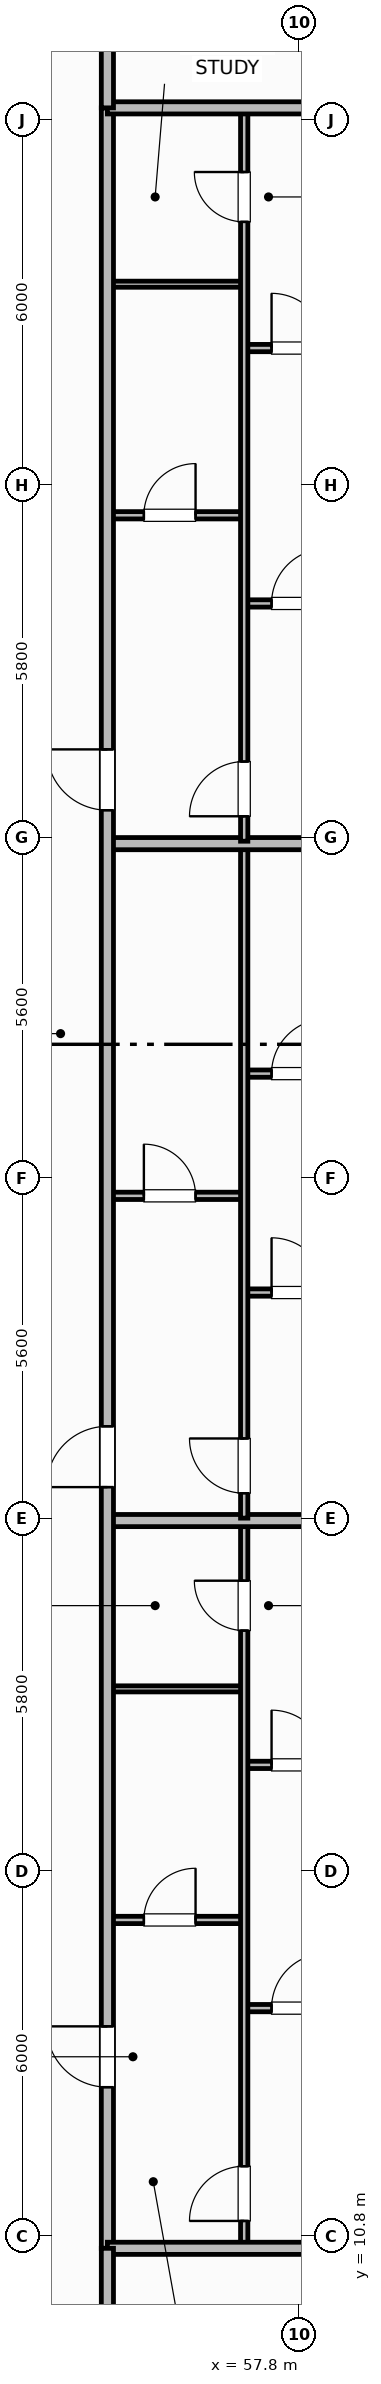
"""IFC4 building model, lengths in metres.
Left out: names, types, materials, properties, quantities, classifications, styles, units other than length and angle.
Written with IfcOpenShell. Run it as: python <this file> out.ifc"""

import sys

from ifc_helpers import new_model, si_unit, direction, frame, frame_2d, origin, place, context, subcontext, project, spatial, rectangle, extrude, element, fill, save


model = new_model("IFC4")
c1 = context("Model", 3, precision=1e-05, world=origin(), true_north=direction((0.0, 1.0)))
c2 = subcontext(c1, "Body", "Model", "MODEL_VIEW")
j1 = project(units=[si_unit("LENGTHUNIT", "METRE"), si_unit("PLANEANGLEUNIT", "RADIAN")], contexts=[c1])
p1 = place(None, origin())
s1 = spatial("IfcSite", under=j1, at=p1, CompositionType="ELEMENT")
p2 = place(p1, origin())
s2 = spatial("IfcBuilding", under=s1, at=p2, CompositionType="ELEMENT")
p3 = place(p2, frame((0.0, 0.0, 125.3)))
s3 = spatial("IfcBuildingStorey", under=s2, at=p3, CompositionType="ELEMENT", Elevation=125.3)
p4 = place(p3, frame((54.65, 16.0, 0.0), z_axis=(0.0, 0.0, 1.0), x_axis=(1.0, 0.0, 0.0)))
e1 = element("IfcWall", 1, at=p4, inside=s3, PredefinedType="PARTITIONING", context=c2, shape_type="SweptSolid", body=[
    extrude(rectangle(XDim=2.25, YDim=0.12, at=frame_2d((1.125, 0.0))), origin(), (0.0, 0.0, 1.0), 2.53),
])
p5 = place(p4, frame((0.6, 0.0, 0.0)))
e2 = element("IfcOpeningElement", 2, at=p5, cuts=e1, PredefinedType="OPENING", context=c2, shape_type="SweptSolid", body=[
    extrude(rectangle(XDim=0.85, YDim=2.1, at=frame_2d((0.425, 1.05))), frame((0.0, 0.07, 0.0), z_axis=(0.0, -1.0, 0.0), x_axis=(1.0, 0.0, 0.0)), (0.0, 0.0, 1.0), 0.14),
])
p6 = place(p3, frame((54.65, 19.8, 0.0), z_axis=(0.0, 0.0, 1.0), x_axis=(1.0, 0.0, 0.0)))
e3 = element("IfcWall", 3, at=p6, inside=s3, PredefinedType="PARTITIONING", context=c2, shape_type="SweptSolid", body=[
    extrude(rectangle(XDim=2.25, YDim=0.1, at=frame_2d((1.125, 0.0))), origin(), (0.0, 0.0, 1.0), 2.53),
])
p7 = place(p3, frame((56.9, 14.55, 0.0), z_axis=(0.0, 0.0, 1.0), x_axis=(1.0, 0.0, 0.0)))
e4 = element("IfcWall", 4, at=p7, inside=s3, PredefinedType="PARTITIONING", context=c2, shape_type="SweptSolid", body=[
    extrude(rectangle(XDim=6.93, YDim=0.12, at=frame_2d((3.465, 0.0))), origin(), (0.0, 0.0, 1.0), 2.53),
])
p8 = place(p7, frame((0.45, 0.0, 0.0)))
e5 = element("IfcOpeningElement", 5, at=p8, cuts=e4, PredefinedType="OPENING", context=c2, shape_type="SweptSolid", body=[
    extrude(rectangle(XDim=0.9, YDim=2.1, at=frame_2d((0.45, 1.05))), frame((0.0, 0.07, 0.0), z_axis=(0.0, -1.0, 0.0), x_axis=(1.0, 0.0, 0.0)), (0.0, 0.0, 1.0), 0.14),
])
p9 = place(p3, frame((56.9, 18.55, 0.0), z_axis=(0.0, 0.0, 1.0), x_axis=(1.0, 0.0, 0.0)))
e6 = element("IfcWall", 6, at=p9, inside=s3, PredefinedType="PARTITIONING", context=c2, shape_type="SweptSolid", body=[
    extrude(rectangle(XDim=6.93, YDim=0.12, at=frame_2d((3.465, 0.0))), origin(), (0.0, 0.0, 1.0), 2.53),
])
p10 = place(p9, frame((0.45, 0.0, 0.0)))
e7 = element("IfcOpeningElement", 7, at=p10, cuts=e6, PredefinedType="OPENING", context=c2, shape_type="SweptSolid", body=[
    extrude(rectangle(XDim=0.9, YDim=2.1, at=frame_2d((0.45, 1.05))), frame((0.0, 0.07, 0.0), z_axis=(0.0, -1.0, 0.0), x_axis=(1.0, 0.0, 0.0)), (0.0, 0.0, 1.0), 0.14),
])
p11 = place(p3, frame((56.9, 10.64, 0.0), z_axis=(0.0, 0.0, 1.0), x_axis=(0.0, 1.0, 0.0)))
e8 = element("IfcWall", 8, at=p11, inside=s3, PredefinedType="PARTITIONING", context=c2, shape_type="SweptSolid", body=[
    extrude(rectangle(XDim=11.888, YDim=0.12, at=frame_2d((5.944, 0.0))), origin(), (0.0, 0.0, 1.0), 2.53),
])
p12 = place(p11, frame((0.41, 0.0, 0.0)))
e9 = element("IfcOpeningElement", 9, at=p12, cuts=e8, PredefinedType="OPENING", context=c2, shape_type="SweptSolid", body=[
    extrude(rectangle(XDim=0.9, YDim=2.1, at=frame_2d((0.45, 1.05))), frame((0.0, 0.07, 0.0), z_axis=(0.0, -1.0, 0.0), x_axis=(1.0, 0.0, 0.0)), (0.0, 0.0, 1.0), 0.14),
])
p13 = place(p11, frame((10.119, 0.0, 0.0)))
e10 = element("IfcOpeningElement", 10, at=p13, cuts=e8, PredefinedType="OPENING", context=c2, shape_type="SweptSolid", body=[
    extrude(rectangle(XDim=0.82, YDim=2.08, at=frame_2d((0.41, 1.04))), frame((0.0, 0.07, 0.0), z_axis=(0.0, -1.0, 0.0), x_axis=(1.0, 0.0, 0.0)), (0.0, 0.0, 1.0), 0.14),
])
p14 = place(p3, frame((54.65, 22.568, 0.0), z_axis=(0.0, 0.0, 1.0), x_axis=(1.0, 0.0, 0.0)))
e11 = element("IfcWall", 11, at=p14, inside=s3, PredefinedType="PARTITIONING", context=c2, shape_type="SweptSolid", body=[
    extrude(rectangle(XDim=9.18, YDim=0.2, at=frame_2d((4.59, 0.0))), origin(), (0.0, 0.0, 1.0), 2.53),
])
p15 = place(p3, frame((54.65, 27.908, 0.0), z_axis=(0.0, 0.0, 1.0), x_axis=(1.0, 0.0, 0.0)))
e12 = element("IfcWall", 12, at=p15, inside=s3, PredefinedType="PARTITIONING", context=c2, shape_type="SweptSolid", body=[
    extrude(rectangle(XDim=2.25, YDim=0.12, at=frame_2d((1.125, 0.0))), origin(), (0.0, 0.0, 1.0), 2.53),
])
p16 = place(p15, frame((0.6, 0.0, 0.0)))
e13 = element("IfcOpeningElement", 13, at=p16, cuts=e12, PredefinedType="OPENING", context=c2, shape_type="SweptSolid", body=[
    extrude(rectangle(XDim=0.85, YDim=2.1, at=frame_2d((0.425, 1.05))), frame((0.0, 0.07, 0.0), z_axis=(0.0, -1.0, 0.0), x_axis=(1.0, 0.0, 0.0)), (0.0, 0.0, 1.0), 0.14),
])
p17 = place(p3, frame((56.9, 26.318, 0.0), z_axis=(0.0, 0.0, 1.0), x_axis=(1.0, 0.0, 0.0)))
e14 = element("IfcWall", 14, at=p17, inside=s3, PredefinedType="PARTITIONING", context=c2, shape_type="SweptSolid", body=[
    extrude(rectangle(XDim=6.351, YDim=0.12, at=frame_2d((3.175, 0.0))), origin(), (0.0, 0.0, 1.0), 2.53),
])
p18 = place(p17, frame((0.45, 0.0, 0.0)))
e15 = element("IfcOpeningElement", 15, at=p18, cuts=e14, PredefinedType="OPENING", context=c2, shape_type="SweptSolid", body=[
    extrude(rectangle(XDim=0.9, YDim=2.1, at=frame_2d((0.45, 1.05))), frame((0.0, 0.07, 0.0), z_axis=(0.0, -1.0, 0.0), x_axis=(1.0, 0.0, 0.0)), (0.0, 0.0, 1.0), 0.14),
])
p19 = place(p3, frame((56.9, 29.918, 0.0), z_axis=(0.0, 0.0, 1.0), x_axis=(1.0, 0.0, 0.0)))
e16 = element("IfcWall", 16, at=p19, inside=s3, PredefinedType="PARTITIONING", context=c2, shape_type="SweptSolid", body=[
    extrude(rectangle(XDim=6.438, YDim=0.12, at=frame_2d((3.219, 0.0))), origin(), (0.0, 0.0, 1.0), 2.53),
])
p20 = place(p19, frame((0.45, 0.0, 0.0)))
e17 = element("IfcOpeningElement", 17, at=p20, cuts=e16, PredefinedType="OPENING", context=c2, shape_type="SweptSolid", body=[
    extrude(rectangle(XDim=0.9, YDim=2.1, at=frame_2d((0.45, 1.05))), frame((0.0, 0.07, 0.0), z_axis=(0.0, -1.0, 0.0), x_axis=(1.0, 0.0, 0.0)), (0.0, 0.0, 1.0), 0.14),
])
p21 = place(p3, frame((56.9, 22.608, 0.0), z_axis=(0.0, 0.0, 1.0), x_axis=(0.0, 1.0, 0.0)))
e18 = element("IfcWall", 18, at=p21, inside=s3, PredefinedType="PARTITIONING", context=c2, shape_type="SweptSolid", body=[
    extrude(rectangle(XDim=11.052, YDim=0.12, at=frame_2d((5.526, 0.0))), origin(), (0.0, 0.0, 1.0), 2.53),
])
p22 = place(p21, frame((0.41, 0.0, 0.0)))
e19 = element("IfcOpeningElement", 19, at=p22, cuts=e18, PredefinedType="OPENING", context=c2, shape_type="SweptSolid", body=[
    extrude(rectangle(XDim=0.9, YDim=2.1, at=frame_2d((0.45, 1.05))), frame((0.0, 0.07, 0.0), z_axis=(0.0, -1.0, 0.0), x_axis=(1.0, 0.0, 0.0)), (0.0, 0.0, 1.0), 0.14),
])
p23 = place(p3, frame((54.65, 33.7, 0.0), z_axis=(0.0, 0.0, 1.0), x_axis=(1.0, 0.0, 0.0)))
e20 = element("IfcWall", 20, at=p23, inside=s3, PredefinedType="PARTITIONING", context=c2, shape_type="SweptSolid", body=[
    extrude(rectangle(XDim=9.18, YDim=0.2, at=frame_2d((4.59, 0.0))), origin(), (0.0, 0.0, 1.0), 2.53),
])
p24 = place(p3, frame((54.65, 39.1, 0.0), z_axis=(0.0, 0.0, 1.0), x_axis=(1.0, 0.0, 0.0)))
e21 = element("IfcWall", 21, at=p24, inside=s3, PredefinedType="PARTITIONING", context=c2, shape_type="SweptSolid", body=[
    extrude(rectangle(XDim=2.25, YDim=0.12, at=frame_2d((1.125, 0.0))), origin(), (0.0, 0.0, 1.0), 2.53),
])
p25 = place(p24, frame((0.6, 0.0, 0.0)))
e22 = element("IfcOpeningElement", 22, at=p25, cuts=e21, PredefinedType="OPENING", context=c2, shape_type="SweptSolid", body=[
    extrude(rectangle(XDim=0.85, YDim=2.1, at=frame_2d((0.425, 1.05))), frame((0.0, 0.07, 0.0), z_axis=(0.0, -1.0, 0.0), x_axis=(1.0, 0.0, 0.0)), (0.0, 0.0, 1.0), 0.14),
])
p26 = place(p3, frame((54.65, 42.9, 0.0), z_axis=(0.0, 0.0, 1.0), x_axis=(1.0, 0.0, 0.0)))
e23 = element("IfcWall", 23, at=p26, inside=s3, PredefinedType="PARTITIONING", context=c2, shape_type="SweptSolid", body=[
    extrude(rectangle(XDim=2.25, YDim=0.1, at=frame_2d((1.125, 0.0))), origin(), (0.0, 0.0, 1.0), 2.53),
])
p27 = place(p3, frame((56.9, 37.65, 0.0), z_axis=(0.0, 0.0, 1.0), x_axis=(1.0, 0.0, 0.0)))
e24 = element("IfcWall", 24, at=p27, inside=s3, PredefinedType="PARTITIONING", context=c2, shape_type="SweptSolid", body=[
    extrude(rectangle(XDim=6.93, YDim=0.12, at=frame_2d((3.465, 0.0))), origin(), (0.0, 0.0, 1.0), 2.53),
])
p28 = place(p27, frame((0.45, 0.0, 0.0)))
e25 = element("IfcOpeningElement", 25, at=p28, cuts=e24, PredefinedType="OPENING", context=c2, shape_type="SweptSolid", body=[
    extrude(rectangle(XDim=0.9, YDim=2.1, at=frame_2d((0.45, 1.05))), frame((0.0, 0.07, 0.0), z_axis=(0.0, -1.0, 0.0), x_axis=(1.0, 0.0, 0.0)), (0.0, 0.0, 1.0), 0.14),
])
p29 = place(p3, frame((56.9, 41.85, 0.0), z_axis=(0.0, 0.0, 1.0), x_axis=(1.0, 0.0, 0.0)))
e26 = element("IfcWall", 26, at=p29, inside=s3, PredefinedType="PARTITIONING", context=c2, shape_type="SweptSolid", body=[
    extrude(rectangle(XDim=6.93, YDim=0.12, at=frame_2d((3.465, 0.0))), origin(), (0.0, 0.0, 1.0), 2.53),
])
p30 = place(p29, frame((0.45, 0.0, 0.0)))
e27 = element("IfcOpeningElement", 27, at=p30, cuts=e26, PredefinedType="OPENING", context=c2, shape_type="SweptSolid", body=[
    extrude(rectangle(XDim=0.9, YDim=2.1, at=frame_2d((0.45, 1.05))), frame((0.0, 0.07, 0.0), z_axis=(0.0, -1.0, 0.0), x_axis=(1.0, 0.0, 0.0)), (0.0, 0.0, 1.0), 0.14),
])
p31 = place(p3, frame((56.9, 33.74, 0.0), z_axis=(0.0, 0.0, 1.0), x_axis=(0.0, 1.0, 0.0)))
e28 = element("IfcWall", 28, at=p31, inside=s3, PredefinedType="PARTITIONING", context=c2, shape_type="SweptSolid", body=[
    extrude(rectangle(XDim=12.02, YDim=0.12, at=frame_2d((6.01, 0.0))), origin(), (0.0, 0.0, 1.0), 2.53),
])
p32 = place(p31, frame((0.41, 0.0, 0.0)))
e29 = element("IfcOpeningElement", 29, at=p32, cuts=e28, PredefinedType="OPENING", context=c2, shape_type="SweptSolid", body=[
    extrude(rectangle(XDim=0.9, YDim=2.1, at=frame_2d((0.45, 1.05))), frame((0.0, 0.07, 0.0), z_axis=(0.0, -1.0, 0.0), x_axis=(1.0, 0.0, 0.0)), (0.0, 0.0, 1.0), 0.14),
])
p33 = place(p31, frame((10.185, 0.0, 0.0)))
e30 = element("IfcOpeningElement", 30, at=p33, cuts=e28, PredefinedType="OPENING", context=c2, shape_type="SweptSolid", body=[
    extrude(rectangle(XDim=0.82, YDim=2.08, at=frame_2d((0.41, 1.04))), frame((0.0, 0.07, 0.0), z_axis=(0.0, -1.0, 0.0), x_axis=(1.0, 0.0, 0.0)), (0.0, 0.0, 1.0), 0.14),
])
p34 = place(p3, frame((54.65, 10.6, 0.0), z_axis=(0.0, 0.0, 1.0), x_axis=(0.0, 1.0, 0.0)))
e31 = element("IfcWall", 31, at=p34, inside=s3, PredefinedType="PARTITIONING", context=c2, shape_type="SweptSolid", body=[
    extrude(rectangle(XDim=35.2, YDim=0.2, at=frame_2d((17.6, 0.0))), origin(), (0.0, 0.0, 1.0), 2.53),
])
p35 = place(p34, frame((2.65, 0.0, 0.0)))
e32 = element("IfcOpeningElement", 32, at=p35, cuts=e31, PredefinedType="OPENING", context=c2, shape_type="SweptSolid", body=[
    extrude(rectangle(XDim=1.0, YDim=2.15, at=frame_2d((0.5, 1.075))), frame((0.0, 0.11, 0.0), z_axis=(0.0, -1.0, 0.0), x_axis=(1.0, 0.0, 0.0)), (0.0, 0.0, 1.0), 0.22),
])
p36 = place(p34, frame((12.518, 0.0, 0.0)))
e33 = element("IfcOpeningElement", 33, at=p36, cuts=e31, PredefinedType="OPENING", context=c2, shape_type="SweptSolid", body=[
    extrude(rectangle(XDim=1.0, YDim=2.15, at=frame_2d((0.5, 1.075))), frame((0.0, 0.11, 0.0), z_axis=(0.0, -1.0, 0.0), x_axis=(1.0, 0.0, 0.0)), (0.0, 0.0, 1.0), 0.22),
])
p37 = place(p34, frame((23.65, 0.0, 0.0)))
e34 = element("IfcOpeningElement", 34, at=p37, cuts=e31, PredefinedType="OPENING", context=c2, shape_type="SweptSolid", body=[
    extrude(rectangle(XDim=1.0, YDim=2.15, at=frame_2d((0.5, 1.075))), frame((0.0, 0.11, 0.0), z_axis=(0.0, -1.0, 0.0), x_axis=(1.0, 0.0, 0.0)), (0.0, 0.0, 1.0), 0.22),
])
for number, where, z_axis, x_axis in (
    (35, (54.65, 10.6, 0.0), (0.0, 0.0, 1.0), (1.0, 0.0, 0.0)),
    (36, (54.65, 45.8, 0.0), (0.0, 0.0, 1.0), (1.0, 0.0, 0.0)),
):
    element("IfcWall", number, at=place(p3, frame(where, z_axis=z_axis, x_axis=x_axis)), inside=s3, PredefinedType="PARTITIONING", context=c2, shape_type="SweptSolid", body=[
        extrude(rectangle(XDim=8.76, YDim=0.2, at=frame_2d((4.38, 0.0))), origin(), (0.0, 0.0, 1.0), 2.53),
    ])
p38 = place(p3, frame((54.65, 4.97, 0.0), z_axis=(0.0, 0.0, 1.0), x_axis=(0.0, 1.0, 0.0)))
e37 = element("IfcWall", 37, at=p38, inside=s3, PredefinedType="PARTITIONING", context=c2, shape_type="SweptSolid", body=[
    extrude(rectangle(XDim=5.63, YDim=0.2, at=frame_2d((2.815, 0.0))), origin(), (0.0, 0.0, 1.0), 2.53),
])
p39 = place(p3, frame((54.65, 45.8, 0.0), z_axis=(0.0, 0.0, 1.0), x_axis=(0.0, 1.0, 0.0)))
e38 = element("IfcWall", 38, at=p39, inside=s3, PredefinedType="PARTITIONING", context=c2, shape_type="SweptSolid", body=[
    extrude(rectangle(XDim=5.63, YDim=0.2, at=frame_2d((2.815, 0.0))), origin(), (0.0, 0.0, 1.0), 2.53),
])
p40 = place(p5, origin())
e39 = element("IfcDoor", 39, at=p40, inside=s3, OperationType="SINGLE_SWING_RIGHT", PredefinedType="DOOR", context=c2, shape_type="SweptSolid", body=[
    extrude(rectangle(XDim=0.85, YDim=2.1, at=frame_2d((0.425, 1.05))), frame((0.0, 0.025, 0.0), z_axis=(0.0, -1.0, 0.0), x_axis=(1.0, 0.0, 0.0)), (0.0, 0.0, 1.0), 0.05),
])
fill(e2, e39)
p41 = place(p8, origin())
e40 = element("IfcDoor", 40, at=p41, inside=s3, OperationType="SINGLE_SWING_RIGHT", PredefinedType="DOOR", context=c2, shape_type="SweptSolid", body=[
    extrude(rectangle(XDim=0.9, YDim=2.1, at=frame_2d((0.45, 1.05))), frame((0.0, 0.025, 0.0), z_axis=(0.0, -1.0, 0.0), x_axis=(1.0, 0.0, 0.0)), (0.0, 0.0, 1.0), 0.05),
])
fill(e5, e40)
p42 = place(p10, origin())
e41 = element("IfcDoor", 41, at=p42, inside=s3, OperationType="SINGLE_SWING_LEFT", PredefinedType="DOOR", context=c2, shape_type="SweptSolid", body=[
    extrude(rectangle(XDim=0.9, YDim=2.1, at=frame_2d((0.45, 1.05))), frame((0.0, 0.025, 0.0), z_axis=(0.0, -1.0, 0.0), x_axis=(1.0, 0.0, 0.0)), (0.0, 0.0, 1.0), 0.05),
])
fill(e7, e41)
p43 = place(p12, origin())
e42 = element("IfcDoor", 42, at=p43, inside=s3, OperationType="SINGLE_SWING_LEFT", PredefinedType="DOOR", context=c2, shape_type="SweptSolid", body=[
    extrude(rectangle(XDim=0.9, YDim=2.1, at=frame_2d((0.45, 1.05))), frame((0.0, 0.025, 0.0), z_axis=(0.0, -1.0, 0.0), x_axis=(1.0, 0.0, 0.0)), (0.0, 0.0, 1.0), 0.05),
])
fill(e9, e42)
p44 = place(p13, origin())
e43 = element("IfcDoor", 43, at=p44, inside=s3, OperationType="SINGLE_SWING_RIGHT", PredefinedType="DOOR", context=c2, shape_type="SweptSolid", body=[
    extrude(rectangle(XDim=0.82, YDim=2.08, at=frame_2d((0.41, 1.04))), frame((0.0, 0.025, 0.0), z_axis=(0.0, -1.0, 0.0), x_axis=(1.0, 0.0, 0.0)), (0.0, 0.0, 1.0), 0.05),
])
fill(e10, e43)
p45 = place(p16, origin())
e44 = element("IfcDoor", 44, at=p45, inside=s3, OperationType="SINGLE_SWING_LEFT", PredefinedType="DOOR", context=c2, shape_type="SweptSolid", body=[
    extrude(rectangle(XDim=0.85, YDim=2.1, at=frame_2d((0.425, 1.05))), frame((0.0, 0.025, 0.0), z_axis=(0.0, -1.0, 0.0), x_axis=(1.0, 0.0, 0.0)), (0.0, 0.0, 1.0), 0.05),
])
fill(e13, e44)
p46 = place(p18, origin())
e45 = element("IfcDoor", 45, at=p46, inside=s3, OperationType="SINGLE_SWING_LEFT", PredefinedType="DOOR", context=c2, shape_type="SweptSolid", body=[
    extrude(rectangle(XDim=0.9, YDim=2.1, at=frame_2d((0.45, 1.05))), frame((0.0, 0.025, 0.0), z_axis=(0.0, -1.0, 0.0), x_axis=(1.0, 0.0, 0.0)), (0.0, 0.0, 1.0), 0.05),
])
fill(e15, e45)
p47 = place(p20, origin())
e46 = element("IfcDoor", 46, at=p47, inside=s3, OperationType="SINGLE_SWING_RIGHT", PredefinedType="DOOR", context=c2, shape_type="SweptSolid", body=[
    extrude(rectangle(XDim=0.9, YDim=2.1, at=frame_2d((0.45, 1.05))), frame((0.0, 0.025, 0.0), z_axis=(0.0, -1.0, 0.0), x_axis=(1.0, 0.0, 0.0)), (0.0, 0.0, 1.0), 0.05),
])
fill(e17, e46)
p48 = place(p22, origin())
e47 = element("IfcDoor", 47, at=p48, inside=s3, OperationType="SINGLE_SWING_RIGHT", PredefinedType="DOOR", context=c2, shape_type="SweptSolid", body=[
    extrude(rectangle(XDim=0.9, YDim=2.1, at=frame_2d((0.45, 1.05))), frame((0.0, 0.025, 0.0), z_axis=(0.0, -1.0, 0.0), x_axis=(1.0, 0.0, 0.0)), (0.0, 0.0, 1.0), 0.05),
])
fill(e19, e47)
p49 = place(p25, origin())
e48 = element("IfcDoor", 48, at=p49, inside=s3, OperationType="SINGLE_SWING_RIGHT", PredefinedType="DOOR", context=c2, shape_type="SweptSolid", body=[
    extrude(rectangle(XDim=0.85, YDim=2.1, at=frame_2d((0.425, 1.05))), frame((0.0, 0.025, 0.0), z_axis=(0.0, -1.0, 0.0), x_axis=(1.0, 0.0, 0.0)), (0.0, 0.0, 1.0), 0.05),
])
fill(e22, e48)
p50 = place(p28, origin())
e49 = element("IfcDoor", 49, at=p50, inside=s3, OperationType="SINGLE_SWING_RIGHT", PredefinedType="DOOR", context=c2, shape_type="SweptSolid", body=[
    extrude(rectangle(XDim=0.9, YDim=2.1, at=frame_2d((0.45, 1.05))), frame((0.0, 0.025, 0.0), z_axis=(0.0, -1.0, 0.0), x_axis=(1.0, 0.0, 0.0)), (0.0, 0.0, 1.0), 0.05),
])
fill(e25, e49)
p51 = place(p30, origin())
e50 = element("IfcDoor", 50, at=p51, inside=s3, OperationType="SINGLE_SWING_LEFT", PredefinedType="DOOR", context=c2, shape_type="SweptSolid", body=[
    extrude(rectangle(XDim=0.9, YDim=2.1, at=frame_2d((0.45, 1.05))), frame((0.0, 0.025, 0.0), z_axis=(0.0, -1.0, 0.0), x_axis=(1.0, 0.0, 0.0)), (0.0, 0.0, 1.0), 0.05),
])
fill(e27, e50)
p52 = place(p32, origin())
e51 = element("IfcDoor", 51, at=p52, inside=s3, OperationType="SINGLE_SWING_LEFT", PredefinedType="DOOR", context=c2, shape_type="SweptSolid", body=[
    extrude(rectangle(XDim=0.9, YDim=2.1, at=frame_2d((0.45, 1.05))), frame((0.0, 0.025, 0.0), z_axis=(0.0, -1.0, 0.0), x_axis=(1.0, 0.0, 0.0)), (0.0, 0.0, 1.0), 0.05),
])
fill(e29, e51)
p53 = place(p33, origin())
e52 = element("IfcDoor", 52, at=p53, inside=s3, OperationType="SINGLE_SWING_RIGHT", PredefinedType="DOOR", context=c2, shape_type="SweptSolid", body=[
    extrude(rectangle(XDim=0.82, YDim=2.08, at=frame_2d((0.41, 1.04))), frame((0.0, 0.025, 0.0), z_axis=(0.0, -1.0, 0.0), x_axis=(1.0, 0.0, 0.0)), (0.0, 0.0, 1.0), 0.05),
])
fill(e30, e52)
p54 = place(p35, origin())
e53 = element("IfcDoor", 53, at=p54, inside=s3, OperationType="SINGLE_SWING_RIGHT", PredefinedType="DOOR", context=c2, shape_type="SweptSolid", body=[
    extrude(rectangle(XDim=1.0, YDim=2.15, at=frame_2d((0.5, 1.075))), frame((0.0, 0.025, 0.0), z_axis=(0.0, -1.0, 0.0), x_axis=(1.0, 0.0, 0.0)), (0.0, 0.0, 1.0), 0.05),
])
fill(e32, e53)
p55 = place(p36, origin())
e54 = element("IfcDoor", 54, at=p55, inside=s3, OperationType="SINGLE_SWING_LEFT", PredefinedType="DOOR", context=c2, shape_type="SweptSolid", body=[
    extrude(rectangle(XDim=1.0, YDim=2.15, at=frame_2d((0.5, 1.075))), frame((0.0, 0.025, 0.0), z_axis=(0.0, -1.0, 0.0), x_axis=(1.0, 0.0, 0.0)), (0.0, 0.0, 1.0), 0.05),
])
fill(e33, e54)
p56 = place(p37, origin())
e55 = element("IfcDoor", 55, at=p56, inside=s3, OperationType="SINGLE_SWING_RIGHT", PredefinedType="DOOR", context=c2, shape_type="SweptSolid", body=[
    extrude(rectangle(XDim=1.0, YDim=2.15, at=frame_2d((0.5, 1.075))), frame((0.0, 0.025, 0.0), z_axis=(0.0, -1.0, 0.0), x_axis=(1.0, 0.0, 0.0)), (0.0, 0.0, 1.0), 0.05),
])
fill(e34, e55)
save(model, sys.argv[1])
